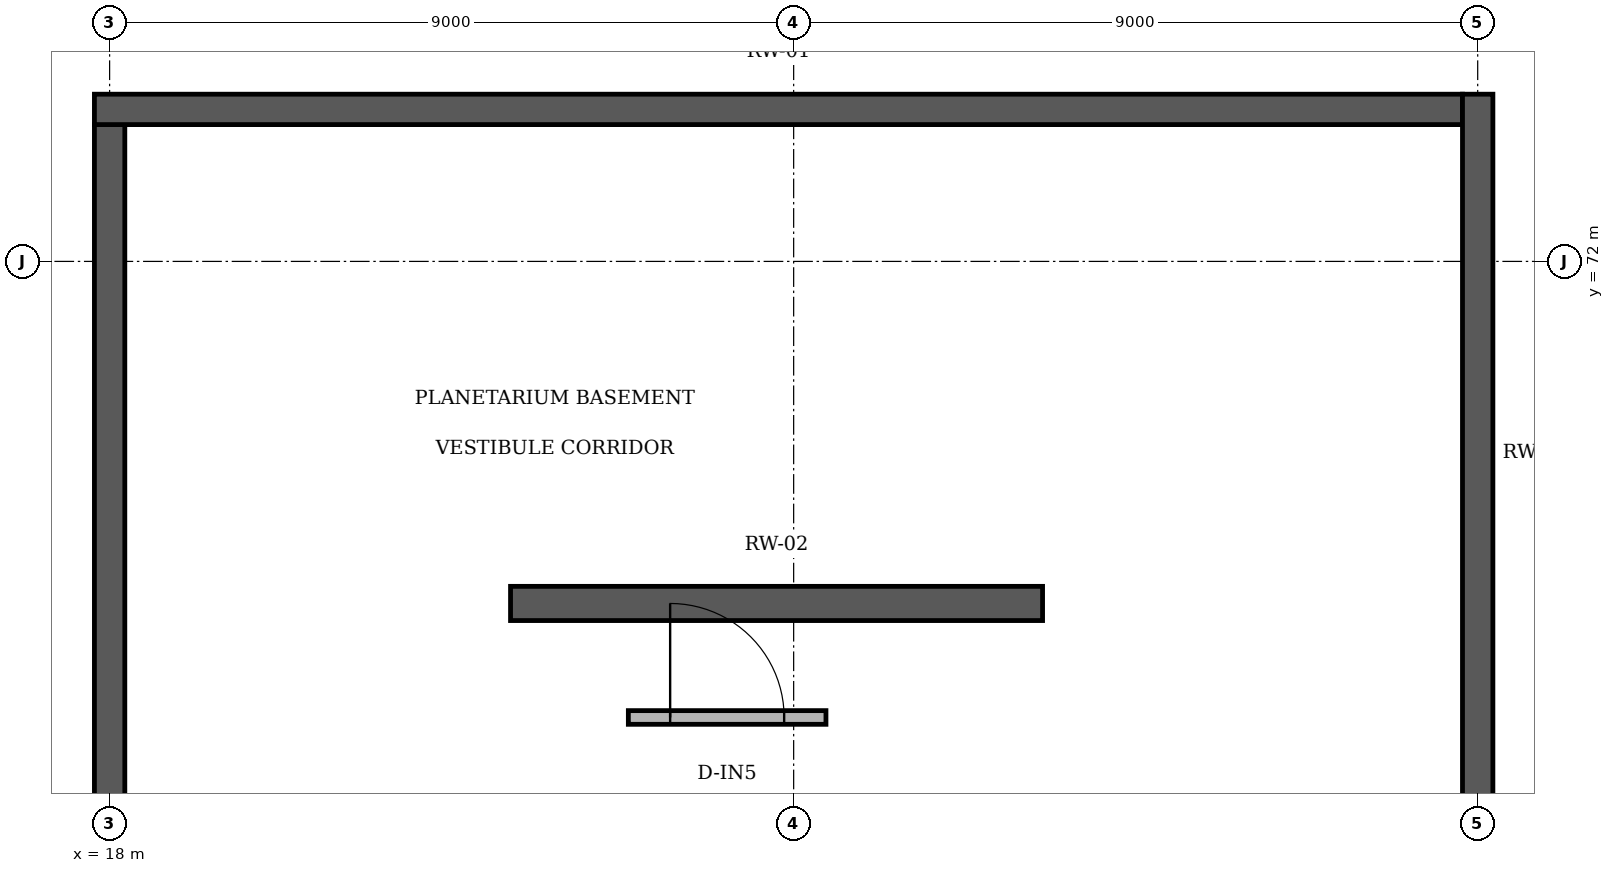
"""IFC4 building model, lengths in metres.
Left out: names, types, materials, properties, quantities, classifications, styles, units other than length and angle.
Written with IfcOpenShell. Run it as: python <this file> out.ifc"""

import sys

from ifc_helpers import new_model, si_unit, direction, frame, frame_2d, origin, place, context, subcontext, project, spatial, rectangle, extrude, element, fill, save


model = new_model("IFC4")
c1 = context("Model", 3, precision=1e-05, world=origin(), true_north=direction((0.0, 1.0)))
c2 = subcontext(c1, "Body", "Model", "MODEL_VIEW")
j1 = project(units=[si_unit("LENGTHUNIT", "METRE"), si_unit("PLANEANGLEUNIT", "RADIAN")], contexts=[c1])
p1 = place(None, origin())
s1 = spatial("IfcSite", under=j1, at=p1, CompositionType="ELEMENT")
p2 = place(p1, origin())
s2 = spatial("IfcBuilding", under=s1, at=p2, CompositionType="ELEMENT")
p3 = place(p2, frame((0.0, 0.0, -4.8)))
s3 = spatial("IfcBuildingStorey", under=s2, at=p3, CompositionType="ELEMENT", Elevation=-4.8)
for number, where, z_axis, x_axis in (
    (1, (18.0, 55.8, -0.35), (0.0, 0.0, 1.0), (0.0, 1.0, 0.0)),
    (2, (17.8, 74.0, -0.35), (0.0, 0.0, 1.0), (1.0, 0.0, 0.0)),
):
    element("IfcWall", number, at=place(p3, frame(where, z_axis=z_axis, x_axis=x_axis)), inside=s3, PredefinedType="USERDEFINED", context=c2, shape_type="SweptSolid", body=[
        extrude(rectangle(XDim=18.0, YDim=0.4, at=frame_2d((9.0, 0.0))), origin(), (0.0, 0.0, 1.0), 3.9),
    ])
p4 = place(p3, frame((36.0, 74.2, -0.35), z_axis=(0.0, 0.0, 1.0), x_axis=(0.0, -1.0, 0.0)))
e3 = element("IfcWall", 3, at=p4, inside=s3, PredefinedType="USERDEFINED", context=c2, shape_type="SweptSolid", body=[
    extrude(rectangle(XDim=9.45, YDim=0.4, at=frame_2d((4.725, 0.0))), origin(), (0.0, 0.0, 1.0), 3.9),
])
p5 = place(p3, frame((23.275, 67.5, -0.35), z_axis=(0.0, 0.0, 1.0), x_axis=(1.0, 0.0, 0.0)))
e4 = element("IfcWall", 4, at=p5, inside=s3, PredefinedType="USERDEFINED", context=c2, shape_type="SweptSolid", body=[
    extrude(rectangle(XDim=7.0, YDim=0.45, at=frame_2d((3.5, 0.0))), origin(), (0.0, 0.0, 1.0), 3.9),
])
p6 = place(p3, frame((24.825, 66.0, 0.0), z_axis=(0.0, 0.0, 1.0), x_axis=(1.0, 0.0, 0.0)))
e5 = element("IfcWall", 5, at=p6, inside=s3, PredefinedType="PARTITIONING", context=c2, shape_type="SweptSolid", body=[
    extrude(rectangle(XDim=2.6, YDim=0.18, at=frame_2d((1.3, 0.0))), origin(), (0.0, 0.0, 1.0), 3.15),
])
p7 = place(p6, frame((0.55, 0.0, 0.0)))
e6 = element("IfcOpeningElement", 6, at=p7, cuts=e5, PredefinedType="OPENING", context=c2, shape_type="SweptSolid", body=[
    extrude(rectangle(XDim=1.5, YDim=2.2, at=frame_2d((0.75, 1.1))), frame((0.0, 0.1, 0.0), z_axis=(0.0, -1.0, 0.0), x_axis=(1.0, 0.0, 0.0)), (0.0, 0.0, 1.0), 0.2),
])
p8 = place(p7, origin())
e7 = element("IfcDoor", 7, at=p8, inside=s3, OperationType="SINGLE_SWING_LEFT", PredefinedType="DOOR", context=c2, shape_type="SweptSolid", body=[
    extrude(rectangle(XDim=1.5, YDim=2.2, at=frame_2d((0.75, 1.1))), frame((0.0, 0.025, 0.0), z_axis=(0.0, -1.0, 0.0), x_axis=(1.0, 0.0, 0.0)), (0.0, 0.0, 1.0), 0.05),
])
fill(e6, e7)
save(model, sys.argv[1])
